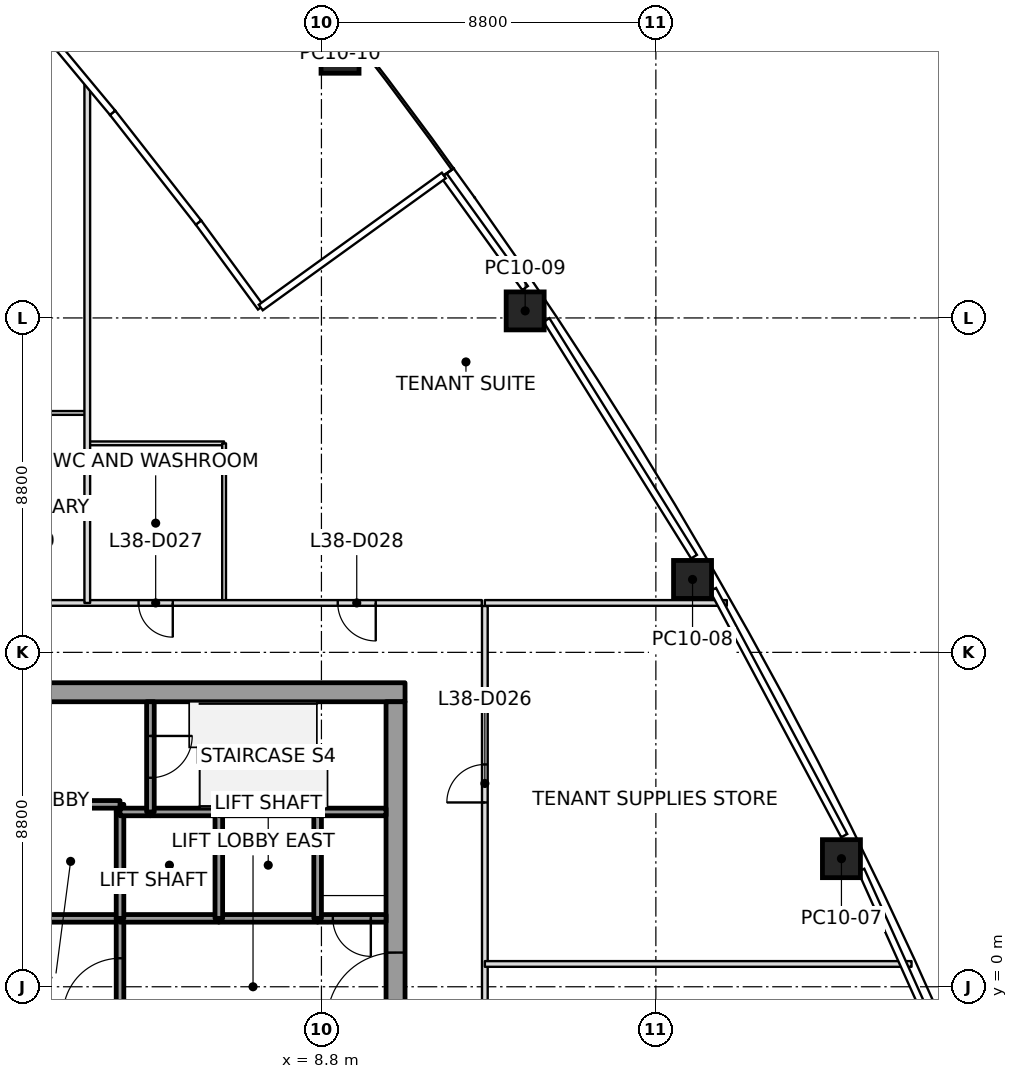
"""IFC4 building model, lengths in metres.
Left out: names, types, materials, properties, quantities, classifications, styles, units other than length and angle.
Written with IfcOpenShell. Run it as: python <this file> out.ifc"""

import sys

from ifc_helpers import new_model, si_unit, direction, frame, frame_2d, origin, origin_2d, place, context, subcontext, project, spatial, rectangle, extrude, element, fill, save


model = new_model("IFC4")
c1 = context("Model", 3, precision=1e-05, world=origin(), true_north=direction((0.0, 1.0)))
c2 = subcontext(c1, "Body", "Model", "MODEL_VIEW")
j1 = project(units=[si_unit("LENGTHUNIT", "METRE"), si_unit("PLANEANGLEUNIT", "RADIAN")], contexts=[c1])
p1 = place(None, origin())
s1 = spatial("IfcSite", under=j1, at=p1, CompositionType="ELEMENT")
p2 = place(p1, origin())
s2 = spatial("IfcBuilding", under=s1, at=p2, CompositionType="ELEMENT")
p3 = place(p2, frame((0.0, 0.0, 173.8)))
s3 = spatial("IfcBuildingStorey", under=s2, at=p3, CompositionType="ELEMENT", Elevation=173.8)
p4 = place(p3, frame((22.483, 3.371, 0.0), z_axis=(-0.014097689605, 0.002074984617, 0.999898469639), x_axis=(-0.440410985466, 0.897759990015, -0.008072435138)))
e1 = element("IfcColumn", 1, at=p4, inside=s3, PredefinedType="COLUMN", context=c2, shape_type="SweptSolid", body=[
    extrude(rectangle(XDim=1.0, YDim=1.0, at=origin_2d()), origin(), (0.0, 0.0, 1.0), 4.0),
])
p5 = place(p3, frame((18.565, 10.719, 0.0), z_axis=(-0.00994807791, -0.005675897212, 0.999934407817), x_axis=(-0.499975258324, 0.866039685968, -5.8244404e-05)))
e2 = element("IfcColumn", 2, at=p5, inside=s3, PredefinedType="COLUMN", context=c2, shape_type="SweptSolid", body=[
    extrude(rectangle(XDim=1.0, YDim=1.0, at=origin_2d()), origin(), (0.0, 0.0, 1.0), 4.0),
])
p6 = place(p3, frame((14.161, 17.785, 0.0), z_axis=(-0.005309522349, -0.013182262383, 0.999899013366), x_axis=(-0.557260557903, 0.830299268078, 0.007987242027)))
e3 = element("IfcColumn", 3, at=p6, inside=s3, PredefinedType="COLUMN", context=c2, shape_type="SweptSolid", body=[
    extrude(rectangle(XDim=1.0, YDim=1.0, at=origin_2d()), origin(), (0.0, 0.0, 1.0), 4.0),
])
p7 = place(p3, frame((9.29, 24.539, 0.0), z_axis=(-0.0002440896, -0.020442503975, 0.999791000385), x_axis=(-0.611997816063, 0.790697226077, 0.016017796599)))
e4 = element("IfcColumn", 4, at=p7, inside=s3, PredefinedType="COLUMN", context=c2, shape_type="SweptSolid", body=[
    extrude(rectangle(XDim=1.0, YDim=1.0, at=origin_2d()), origin(), (0.0, 0.0, 1.0), 4.001),
])
p8 = place(p3, frame((-11.0, 7.75, 0.0), z_axis=(0.0, 0.0, 1.0), x_axis=(1.0, 0.0, 0.0)))
e5 = element("IfcWall", 5, at=p8, inside=s3, PredefinedType="SHEAR", context=c2, shape_type="SweptSolid", body=[
    extrude(rectangle(XDim=22.0, YDim=0.5, at=frame_2d((11.0, 0.0))), origin(), (0.0, 0.0, 1.0), 4.0),
])
p9 = place(p8, frame((10.45, 0.0, 0.0)))
e6 = element("IfcOpeningElement", 6, at=p9, cuts=e5, PredefinedType="OPENING", context=c2, shape_type="SweptSolid", body=[
    extrude(rectangle(XDim=1.1, YDim=2.1, at=frame_2d((0.55, 1.05))), frame((0.0, 0.25, 0.0), z_axis=(0.0, -1.0, 0.0), x_axis=(1.0, 0.0, 0.0)), (0.0, 0.0, 1.0), 0.5),
])
p10 = place(p3, frame((10.75, -7.5, 0.0), z_axis=(0.0, 0.0, 1.0), x_axis=(0.0, 1.0, 0.0)))
e7 = element("IfcWall", 7, at=p10, inside=s3, PredefinedType="SHEAR", context=c2, shape_type="SweptSolid", body=[
    extrude(rectangle(XDim=15.0, YDim=0.5, at=frame_2d((7.5, 0.0))), origin(), (0.0, 0.0, 1.0), 4.0),
])
p11 = place(p10, frame((6.6, 0.0, 0.0)))
e8 = element("IfcOpeningElement", 8, at=p11, cuts=e7, PredefinedType="OPENING", context=c2, shape_type="SweptSolid", body=[
    extrude(rectangle(XDim=1.8, YDim=2.1, at=frame_2d((0.9, 1.05))), frame((0.0, 0.25, 0.0), z_axis=(0.0, -1.0, 0.0), x_axis=(1.0, 0.0, 0.0)), (0.0, 0.0, 1.0), 0.5),
])
p12 = place(p3, frame((3.5, 1.8, 0.0), z_axis=(0.0, 0.0, 1.0), x_axis=(-1.0, 0.0, 0.0)))
e9 = element("IfcWall", 9, at=p12, inside=s3, PredefinedType="SOLIDWALL", context=c2, shape_type="SweptSolid", body=[
    extrude(rectangle(XDim=2.6, YDim=0.2, at=frame_2d((1.3, 0.0))), origin(), (0.0, 0.0, 1.0), 3.85),
])
p13 = place(p3, frame((3.5, 4.6, 0.0), z_axis=(0.0, 0.0, 1.0), x_axis=(0.0, 1.0, 0.0)))
e10 = element("IfcWall", 10, at=p13, inside=s3, PredefinedType="SOLIDWALL", context=c2, shape_type="SweptSolid", body=[
    extrude(rectangle(XDim=0.2, YDim=0.2, at=frame_2d((0.1, 0.0))), origin(), (0.0, 0.0, 1.0), 3.85),
])
p14 = place(p3, frame((3.5, 4.8, 0.0), z_axis=(0.0, 0.0, 1.0), x_axis=(-1.0, 0.0, 0.0)))
e11 = element("IfcWall", 11, at=p14, inside=s3, PredefinedType="SOLIDWALL", context=c2, shape_type="SweptSolid", body=[
    extrude(rectangle(XDim=2.6, YDim=0.2, at=frame_2d((1.3, 0.0))), origin(), (0.0, 0.0, 1.0), 3.85),
])
p15 = place(p3, frame((3.5, -1.8, 0.0), z_axis=(0.0, 0.0, 1.0), x_axis=(0.0, 1.0, 0.0)))
e12 = element("IfcWall", 12, at=p15, inside=s3, PredefinedType="SOLIDWALL", context=c2, shape_type="SweptSolid", body=[
    extrude(rectangle(XDim=3.6, YDim=0.2, at=frame_2d((1.8, 0.0))), origin(), (0.0, 0.0, 1.0), 3.85),
])
p16 = place(p15, frame((1.05, 0.0, 0.0)))
e13 = element("IfcOpeningElement", 13, at=p16, cuts=e12, PredefinedType="OPENING", context=c2, shape_type="SweptSolid", body=[
    extrude(rectangle(XDim=1.5, YDim=2.1, at=frame_2d((0.75, 1.05))), frame((0.0, 0.1, 0.0), z_axis=(0.0, -1.0, 0.0), x_axis=(1.0, 0.0, 0.0)), (0.0, 0.0, 1.0), 0.2),
])
p17 = place(p3, frame((6.1, 1.8, 0.0), z_axis=(0.0, 0.0, 1.0), x_axis=(-1.0, 0.0, 0.0)))
e14 = element("IfcWall", 14, at=p17, inside=s3, PredefinedType="SOLIDWALL", context=c2, shape_type="SweptSolid", body=[
    extrude(rectangle(XDim=2.6, YDim=0.2, at=frame_2d((1.3, 0.0))), origin(), (0.0, 0.0, 1.0), 3.85),
])
p18 = place(p3, frame((3.5, 1.8, 0.0), z_axis=(0.0, 0.0, 1.0), x_axis=(0.0, 1.0, 0.0)))
e15 = element("IfcWall", 15, at=p18, inside=s3, PredefinedType="SOLIDWALL", context=c2, shape_type="SweptSolid", body=[
    extrude(rectangle(XDim=2.8, YDim=0.2, at=frame_2d((1.4, 0.0))), origin(), (0.0, 0.0, 1.0), 3.85),
])
p19 = place(p3, frame((4.3, 4.6, 0.0), z_axis=(0.0, 0.0, 1.0), x_axis=(-1.0, 0.0, 0.0)))
e16 = element("IfcWall", 16, at=p19, inside=s3, PredefinedType="SOLIDWALL", context=c2, shape_type="SweptSolid", body=[
    extrude(rectangle(XDim=0.8, YDim=0.2, at=frame_2d((0.4, 0.0))), origin(), (0.0, 0.0, 1.0), 3.85),
])
p20 = place(p3, frame((6.1, 4.6, 0.0), z_axis=(0.0, 0.0, 1.0), x_axis=(-1.0, 0.0, 0.0)))
e17 = element("IfcWall", 17, at=p20, inside=s3, PredefinedType="SOLIDWALL", context=c2, shape_type="SweptSolid", body=[
    extrude(rectangle(XDim=1.8, YDim=0.2, at=frame_2d((0.9, 0.0))), origin(), (0.0, 0.0, 1.0), 3.85),
])
p21 = place(p3, frame((4.3, 7.5, 0.0), z_axis=(0.0, 0.0, 1.0), x_axis=(0.0, -1.0, 0.0)))
e18 = element("IfcWall", 18, at=p21, inside=s3, PredefinedType="SOLIDWALL", context=c2, shape_type="SweptSolid", body=[
    extrude(rectangle(XDim=2.9, YDim=0.2, at=frame_2d((1.45, 0.0))), origin(), (0.0, 0.0, 1.0), 3.85),
])
p22 = place(p21, frame((0.9, 0.0, 0.0)))
e19 = element("IfcOpeningElement", 19, at=p22, cuts=e18, PredefinedType="OPENING", context=c2, shape_type="SweptSolid", body=[
    extrude(rectangle(XDim=1.1, YDim=2.1, at=frame_2d((0.55, 1.05))), frame((0.0, 0.1, 0.0), z_axis=(0.0, -1.0, 0.0), x_axis=(1.0, 0.0, 0.0)), (0.0, 0.0, 1.0), 0.2),
])
p23 = place(p3, frame((8.7, 1.8, 0.0), z_axis=(0.0, 0.0, 1.0), x_axis=(-1.0, 0.0, 0.0)))
e20 = element("IfcWall", 20, at=p23, inside=s3, PredefinedType="SOLIDWALL", context=c2, shape_type="SweptSolid", body=[
    extrude(rectangle(XDim=2.6, YDim=0.2, at=frame_2d((1.3, 0.0))), origin(), (0.0, 0.0, 1.0), 3.85),
])
p24 = place(p3, frame((6.1, 1.8, 0.0), z_axis=(0.0, 0.0, 1.0), x_axis=(0.0, 1.0, 0.0)))
e21 = element("IfcWall", 21, at=p24, inside=s3, PredefinedType="SOLIDWALL", context=c2, shape_type="SweptSolid", body=[
    extrude(rectangle(XDim=2.8, YDim=0.2, at=frame_2d((1.4, 0.0))), origin(), (0.0, 0.0, 1.0), 3.85),
])
p25 = place(p3, frame((8.7, 4.6, 0.0), z_axis=(0.0, 0.0, 1.0), x_axis=(-1.0, 0.0, 0.0)))
e22 = element("IfcWall", 22, at=p25, inside=s3, PredefinedType="SOLIDWALL", context=c2, shape_type="SweptSolid", body=[
    extrude(rectangle(XDim=2.6, YDim=0.2, at=frame_2d((1.3, 0.0))), origin(), (0.0, 0.0, 1.0), 3.85),
])
p26 = place(p3, frame((10.5, 1.8, 0.0), z_axis=(0.0, 0.0, 1.0), x_axis=(-1.0, 0.0, 0.0)))
e23 = element("IfcWall", 23, at=p26, inside=s3, PredefinedType="SOLIDWALL", context=c2, shape_type="SweptSolid", body=[
    extrude(rectangle(XDim=1.8, YDim=0.2, at=frame_2d((0.9, 0.0))), origin(), (0.0, 0.0, 1.0), 3.85),
])
p27 = place(p26, frame((0.4, 0.0, 0.0)))
e24 = element("IfcOpeningElement", 24, at=p27, cuts=e23, PredefinedType="OPENING", context=c2, shape_type="SweptSolid", body=[
    extrude(rectangle(XDim=1.0, YDim=2.1, at=frame_2d((0.5, 1.05))), frame((0.0, 0.1, 0.0), z_axis=(0.0, -1.0, 0.0), x_axis=(1.0, 0.0, 0.0)), (0.0, 0.0, 1.0), 0.2),
])
p28 = place(p3, frame((8.7, 4.6, 0.0), z_axis=(0.0, 0.0, 1.0), x_axis=(0.0, -1.0, 0.0)))
e25 = element("IfcWall", 25, at=p28, inside=s3, PredefinedType="SOLIDWALL", context=c2, shape_type="SweptSolid", body=[
    extrude(rectangle(XDim=2.8, YDim=0.2, at=frame_2d((1.4, 0.0))), origin(), (0.0, 0.0, 1.0), 3.85),
])
p29 = place(p3, frame((10.5, 4.6, 0.0), z_axis=(0.0, 0.0, 1.0), x_axis=(-1.0, 0.0, 0.0)))
e26 = element("IfcWall", 26, at=p29, inside=s3, PredefinedType="SOLIDWALL", context=c2, shape_type="SweptSolid", body=[
    extrude(rectangle(XDim=1.8, YDim=0.2, at=frame_2d((0.9, 0.0))), origin(), (0.0, 0.0, 1.0), 3.85),
])
p30 = place(p3, frame((2.638, 10.1, 0.0), z_axis=(0.0, 0.0, 1.0), x_axis=(0.0, 1.0, 0.0)))
e27 = element("IfcWall", 27, at=p30, inside=s3, PredefinedType="PARTITIONING", context=c2, shape_type="SweptSolid", body=[
    extrude(rectangle(XDim=13.711, YDim=0.15, at=frame_2d((6.856, 0.0))), origin(), (0.0, 0.0, 1.0), 3.247),
])
p31 = place(p3, frame((24.327, 0.6, 0.0), z_axis=(0.0, 0.0, 1.0), x_axis=(-1.0, 0.0, 0.0)))
e28 = element("IfcWall", 28, at=p31, inside=s3, PredefinedType="PARTITIONING", context=c2, shape_type="SweptSolid", body=[
    extrude(rectangle(XDim=11.227, YDim=0.15, at=frame_2d((5.614, 0.0))), origin(), (0.0, 0.0, 1.0), 3.234),
])
p32 = place(p3, frame((13.1, 10.1, 0.0), z_axis=(0.0, 0.0, 1.0), x_axis=(1.0, 0.0, 0.0)))
e29 = element("IfcWall", 29, at=p32, inside=s3, PredefinedType="PARTITIONING", context=c2, shape_type="SweptSolid", body=[
    extrude(rectangle(XDim=6.367, YDim=0.15, at=frame_2d((3.184, 0.0))), origin(), (0.0, 0.0, 1.0), 3.234),
])
p33 = place(p3, frame((13.02, 10.1, 0.0), z_axis=(0.0, 0.0, 1.0), x_axis=(-1.0, 0.0, 0.0)))
e30 = element("IfcWall", 30, at=p33, inside=s3, PredefinedType="PARTITIONING", context=c2, shape_type="SweptSolid", body=[
    extrude(rectangle(XDim=25.382, YDim=0.15, at=frame_2d((12.691, 0.0))), origin(), (0.0, 0.0, 1.0), 3.166),
])
p34 = place(p33, frame((8.132, 0.0, 0.0)))
e31 = element("IfcOpeningElement", 31, at=p34, cuts=e30, PredefinedType="OPENING", context=c2, shape_type="SweptSolid", body=[
    extrude(rectangle(XDim=0.9, YDim=2.1, at=frame_2d((0.45, 1.05))), frame((0.0, 0.075, 0.0), z_axis=(0.0, -1.0, 0.0), x_axis=(1.0, 0.0, 0.0)), (0.0, 0.0, 1.0), 0.15),
])
p35 = place(p33, frame((2.791, 0.0, 0.0)))
e32 = element("IfcOpeningElement", 32, at=p35, cuts=e30, PredefinedType="OPENING", context=c2, shape_type="SweptSolid", body=[
    extrude(rectangle(XDim=1.0, YDim=2.1, at=frame_2d((0.5, 1.05))), frame((0.0, 0.075, 0.0), z_axis=(0.0, -1.0, 0.0), x_axis=(1.0, 0.0, 0.0)), (0.0, 0.0, 1.0), 0.15),
])
p36 = place(p33, frame((12.032, 0.0, 0.0)))
e33 = element("IfcOpeningElement", 33, at=p36, cuts=e30, PredefinedType="OPENING", context=c2, shape_type="SweptSolid", body=[
    extrude(rectangle(XDim=0.9, YDim=2.1, at=frame_2d((0.45, 1.05))), frame((0.0, 0.075, 0.0), z_axis=(0.0, -1.0, 0.0), x_axis=(1.0, 0.0, 0.0)), (0.0, 0.0, 1.0), 0.15),
])
p37 = place(p33, frame((19.532, 0.0, 0.0)))
e34 = element("IfcOpeningElement", 34, at=p37, cuts=e30, PredefinedType="OPENING", context=c2, shape_type="SweptSolid", body=[
    extrude(rectangle(XDim=1.0, YDim=2.1, at=frame_2d((0.5, 1.05))), frame((0.0, 0.075, 0.0), z_axis=(0.0, -1.0, 0.0), x_axis=(1.0, 0.0, 0.0)), (0.0, 0.0, 1.0), 0.15),
])
p38 = place(p3, frame((13.1, -10.02, 0.0), z_axis=(0.0, 0.0, 1.0), x_axis=(0.0, 1.0, 0.0)))
e35 = element("IfcWall", 35, at=p38, inside=s3, PredefinedType="PARTITIONING", context=c2, shape_type="SweptSolid", body=[
    extrude(rectangle(XDim=20.04, YDim=0.15, at=frame_2d((10.02, 0.0))), origin(), (0.0, 0.0, 1.0), 3.166),
])
p39 = place(p38, frame((14.87, 0.0, 0.0)))
e36 = element("IfcOpeningElement", 36, at=p39, cuts=e35, PredefinedType="OPENING", context=c2, shape_type="SweptSolid", body=[
    extrude(rectangle(XDim=1.0, YDim=2.1, at=frame_2d((0.5, 1.05))), frame((0.0, 0.075, 0.0), z_axis=(0.0, -1.0, 0.0), x_axis=(1.0, 0.0, 0.0)), (0.0, 0.0, 1.0), 0.15),
])
p40 = place(p38, frame((1.95, 0.0, 0.0)))
e37 = element("IfcOpeningElement", 37, at=p40, cuts=e35, PredefinedType="OPENING", context=c2, shape_type="SweptSolid", body=[
    extrude(rectangle(XDim=0.9, YDim=2.1, at=frame_2d((0.45, 1.05))), frame((0.0, 0.075, 0.0), z_axis=(0.0, -1.0, 0.0), x_axis=(1.0, 0.0, 0.0)), (0.0, 0.0, 1.0), 0.15),
])
p41 = place(p38, frame((7.31, 0.0, 0.0)))
e38 = element("IfcOpeningElement", 38, at=p41, cuts=e35, PredefinedType="OPENING", context=c2, shape_type="SweptSolid", body=[
    extrude(rectangle(XDim=1.0, YDim=2.1, at=frame_2d((0.5, 1.05))), frame((0.0, 0.075, 0.0), z_axis=(0.0, -1.0, 0.0), x_axis=(1.0, 0.0, 0.0)), (0.0, 0.0, 1.0), 0.15),
])
p42 = place(p3, frame((-1.562, 15.1, 0.0), z_axis=(0.0, 0.0, 1.0), x_axis=(1.0, 0.0, 0.0)))
e39 = element("IfcWall", 39, at=p42, inside=s3, PredefinedType="PARTITIONING", context=c2, shape_type="SweptSolid", body=[
    extrude(rectangle(XDim=4.17, YDim=0.1, at=frame_2d((2.085, 0.0))), origin(), (0.0, 0.0, 1.0), 3.166),
])
p43 = place(p3, frame((2.668, 14.3, 0.0), z_axis=(0.0, 0.0, 1.0), x_axis=(1.0, 0.0, 0.0)))
e40 = element("IfcWall", 40, at=p43, inside=s3, PredefinedType="PARTITIONING", context=c2, shape_type="SweptSolid", body=[
    extrude(rectangle(XDim=3.57, YDim=0.1, at=frame_2d((1.785, 0.0))), origin(), (0.0, 0.0, 1.0), 3.247),
])
p44 = place(p3, frame((6.238, 14.3, 0.0), z_axis=(0.0, 0.0, 1.0), x_axis=(0.0, -1.0, 0.0)))
e41 = element("IfcWall", 41, at=p44, inside=s3, PredefinedType="PARTITIONING", context=c2, shape_type="SweptSolid", body=[
    extrude(rectangle(XDim=4.17, YDim=0.1, at=frame_2d((2.085, 0.0))), origin(), (0.0, 0.0, 1.0), 3.247),
])
p45 = place(p39, origin())
e42 = element("IfcDoor", 42, at=p45, inside=s3, OperationType="SINGLE_SWING_LEFT", PredefinedType="DOOR", context=c2, shape_type="SweptSolid", body=[
    extrude(rectangle(XDim=1.0, YDim=2.1, at=frame_2d((0.5, 1.05))), frame((0.0, 0.025, 0.0), z_axis=(0.0, -1.0, 0.0), x_axis=(1.0, 0.0, 0.0)), (0.0, 0.0, 1.0), 0.05),
])
fill(e36, e42)
p46 = place(p34, origin())
e43 = element("IfcDoor", 43, at=p46, inside=s3, OperationType="SINGLE_SWING_LEFT", PredefinedType="DOOR", context=c2, shape_type="SweptSolid", body=[
    extrude(rectangle(XDim=0.9, YDim=2.1, at=frame_2d((0.45, 1.05))), frame((0.0, 0.025, 0.0), z_axis=(0.0, -1.0, 0.0), x_axis=(1.0, 0.0, 0.0)), (0.0, 0.0, 1.0), 0.05),
])
fill(e31, e43)
p47 = place(p35, origin())
e44 = element("IfcDoor", 44, at=p47, inside=s3, OperationType="SINGLE_SWING_RIGHT", PredefinedType="DOOR", context=c2, shape_type="SweptSolid", body=[
    extrude(rectangle(XDim=1.0, YDim=2.1, at=frame_2d((0.5, 1.05))), frame((0.0, 0.025, 0.0), z_axis=(0.0, -1.0, 0.0), x_axis=(1.0, 0.0, 0.0)), (0.0, 0.0, 1.0), 0.05),
])
fill(e32, e44)
p48 = place(p16, origin())
e45 = element("IfcDoor", 45, at=p48, inside=s3, OperationType="DOUBLE_DOOR_SINGLE_SWING", PredefinedType="DOOR", context=c2, shape_type="SweptSolid", body=[
    extrude(rectangle(XDim=1.5, YDim=2.1, at=frame_2d((0.75, 1.05))), frame((0.0, 0.025, 0.0), z_axis=(0.0, -1.0, 0.0), x_axis=(1.0, 0.0, 0.0)), (0.0, 0.0, 1.0), 0.05),
])
fill(e13, e45)
p49 = place(p27, origin())
e46 = element("IfcDoor", 46, at=p49, inside=s3, OperationType="SINGLE_SWING_LEFT", PredefinedType="DOOR", context=c2, shape_type="SweptSolid", body=[
    extrude(rectangle(XDim=1.0, YDim=2.1, at=frame_2d((0.5, 1.05))), frame((0.0, 0.025, 0.0), z_axis=(0.0, -1.0, 0.0), x_axis=(1.0, 0.0, 0.0)), (0.0, 0.0, 1.0), 0.05),
])
fill(e24, e46)
p50 = place(p22, origin())
e47 = element("IfcDoor", 47, at=p50, inside=s3, OperationType="SINGLE_SWING_RIGHT", PredefinedType="DOOR", context=c2, shape_type="SweptSolid", body=[
    extrude(rectangle(XDim=1.1, YDim=2.1, at=frame_2d((0.55, 1.05))), frame((0.0, 0.025, 0.0), z_axis=(0.0, -1.0, 0.0), x_axis=(1.0, 0.0, 0.0)), (0.0, 0.0, 1.0), 0.05),
])
fill(e19, e47)
p51 = place(p11, origin())
e48 = element("IfcDoor", 48, at=p51, inside=s3, OperationType="DOUBLE_DOOR_SINGLE_SWING", PredefinedType="DOOR", context=c2, shape_type="SweptSolid", body=[
    extrude(rectangle(XDim=1.8, YDim=2.1, at=frame_2d((0.9, 1.05))), frame((0.0, 0.025, 0.0), z_axis=(0.0, -1.0, 0.0), x_axis=(1.0, 0.0, 0.0)), (0.0, 0.0, 1.0), 0.05),
])
fill(e8, e48)
save(model, sys.argv[1])
